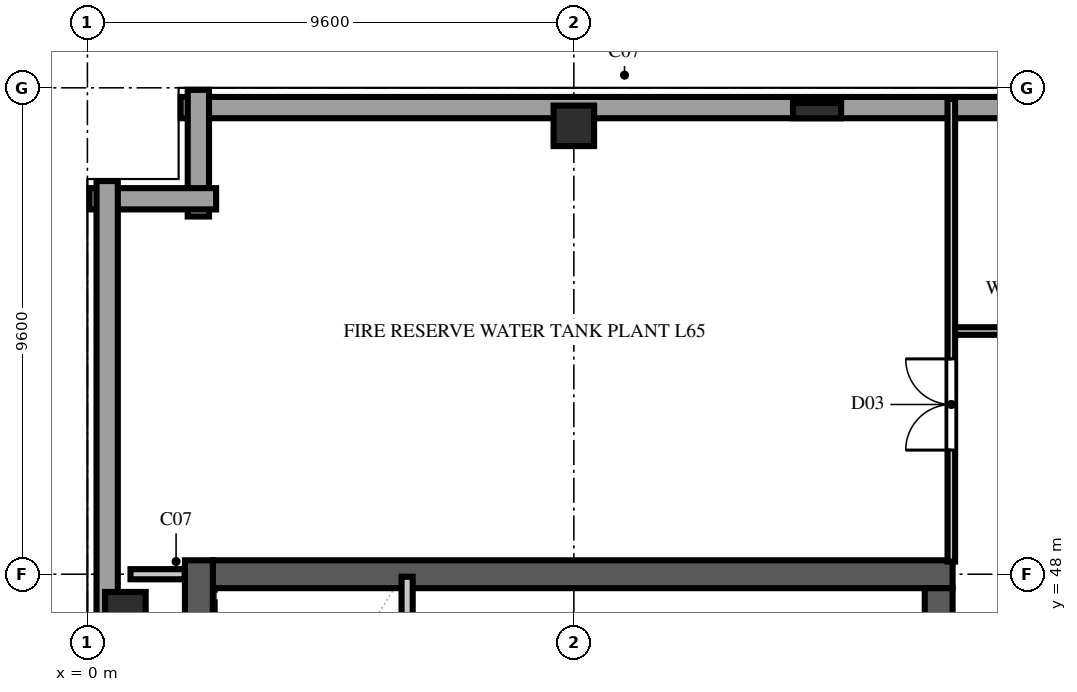
"""IFC4 building model, lengths in metres.
Left out: names, types, materials, properties, quantities, classifications, styles, units other than length and angle.
Written with IfcOpenShell. Run it as: python <this file> out.ifc"""

import sys

from ifc_helpers import new_model, si_unit, direction, frame, frame_2d, origin, origin_2d, place, context, subcontext, project, spatial, rectangle, extrude, element, fill, save


model = new_model("IFC4")
c1 = context("Model", 3, precision=1e-05, world=origin(), true_north=direction((0.0, 1.0)))
c2 = subcontext(c1, "Body", "Model", "MODEL_VIEW")
j1 = project(units=[si_unit("LENGTHUNIT", "METRE"), si_unit("PLANEANGLEUNIT", "RADIAN")], contexts=[c1])
p1 = place(None, origin())
s1 = spatial("IfcSite", under=j1, at=p1, CompositionType="ELEMENT")
p2 = place(p1, origin())
s2 = spatial("IfcBuilding", under=s1, at=p2, CompositionType="ELEMENT")
p3 = place(p2, frame((0.0, 0.0, 256.0)))
s3 = spatial("IfcBuildingStorey", under=s2, at=p3, CompositionType="ELEMENT", Elevation=256.0)
p4 = place(p3, frame((2.475, 48.0, 0.0), z_axis=(0.0, 0.0, 1.0), x_axis=(1.0, 0.0, 0.0)))
e1 = element("IfcWall", 1, at=p4, inside=s3, PredefinedType="SHEAR", context=c2, shape_type="SweptSolid", body=[
    extrude(rectangle(XDim=14.6, YDim=0.55, at=frame_2d((7.3, 0.0))), origin(), (0.0, 0.0, 1.0), 4.74),
])
p5 = place(p3, frame((2.2, 9.325, 0.0), z_axis=(0.0, 0.0, 1.0), x_axis=(0.0, 1.0, 0.0)))
e2 = element("IfcWall", 2, at=p5, inside=s3, PredefinedType="SHEAR", context=c2, shape_type="SweptSolid", body=[
    extrude(rectangle(XDim=38.95, YDim=0.55, at=frame_2d((19.475, 0.0))), origin(), (0.0, 0.0, 1.0), 4.74),
])
p6 = place(p3, frame((16.8, 36.4, 0.0), z_axis=(0.0, 0.0, 1.0), x_axis=(0.0, 1.0, 0.0)))
e3 = element("IfcWall", 3, at=p6, inside=s3, PredefinedType="SHEAR", context=c2, shape_type="SweptSolid", body=[
    extrude(rectangle(XDim=11.325, YDim=0.55, at=frame_2d((5.663, 0.0))), origin(), (0.0, 0.0, 1.0), 4.74),
])
p7 = place(p6, frame((9.2, 0.0, 0.0)))
e4 = element("IfcOpeningElement", 4, at=p7, cuts=e3, PredefinedType="OPENING", context=c2, shape_type="SweptSolid", body=[
    extrude(rectangle(XDim=0.95, YDim=2.15, at=frame_2d((0.475, 1.075))), frame((0.0, 0.287, 0.0), z_axis=(0.0, -1.0, 0.0), x_axis=(1.0, 0.0, 0.0)), (0.0, 0.0, 1.0), 0.574),
])
p8 = place(p3, frame((0.75, 47.25, 0.0), z_axis=(0.0, 0.0, 1.0), x_axis=(1.0, 0.0, 0.0)))
e5 = element("IfcColumn", 5, at=p8, inside=s3, PredefinedType="COLUMN", context=c2, shape_type="SweptSolid", body=[
    extrude(rectangle(XDim=0.8, YDim=0.8, at=origin_2d()), origin(), (0.0, 0.0, 1.0), 5.0),
])
p9 = place(p3, frame((9.6, 56.85, 0.0), z_axis=(0.0, 0.0, 1.0), x_axis=(1.0, 0.0, 0.0)))
e6 = element("IfcColumn", 6, at=p9, inside=s3, PredefinedType="COLUMN", context=c2, shape_type="SweptSolid", body=[
    extrude(rectangle(XDim=0.8, YDim=0.8, at=origin_2d()), origin(), (0.0, 0.0, 1.0), 4.7),
])
p10 = place(p3, frame((14.4, 57.15, 0.0), z_axis=(0.0, 0.0, 1.0), x_axis=(1.0, 0.0, 0.0)))
e7 = element("IfcColumn", 7, at=p10, inside=s3, PredefinedType="PILASTER", context=c2, shape_type="SweptSolid", body=[
    extrude(rectangle(XDim=0.95, YDim=0.3, at=origin_2d()), origin(), (0.0, 0.0, 1.0), 4.7),
])
p11 = place(p3, frame((36.56, 57.21, 0.0), z_axis=(0.0, 0.0, 1.0), x_axis=(-1.0, 0.0, 0.0)))
e8 = element("IfcWall", 8, at=p11, inside=s3, PredefinedType="SOLIDWALL", context=c2, shape_type="SweptSolid", body=[
    extrude(rectangle(XDim=34.72, YDim=0.42, at=frame_2d((17.36, 0.0))), origin(), (0.0, 0.0, 1.0), 4.7),
])
for number, where, z_axis, x_axis in (
    (9, (2.19, 57.56, 0.0), (0.0, 0.0, 1.0), (0.0, -1.0, 0.0)),
    (10, (2.54, 55.41, 0.0), (0.0, 0.0, 1.0), (-1.0, 0.0, 0.0)),
):
    element("IfcWall", number, at=place(p3, frame(where, z_axis=z_axis, x_axis=x_axis)), inside=s3, PredefinedType="SOLIDWALL", context=c2, shape_type="SweptSolid", body=[
        extrude(rectangle(XDim=2.5, YDim=0.42, at=frame_2d((1.25, 0.0))), origin(), (0.0, 0.0, 1.0), 4.7),
    ])
p12 = place(p3, frame((0.39, 55.76, 0.0), z_axis=(0.0, 0.0, 1.0), x_axis=(0.0, -1.0, 0.0)))
e11 = element("IfcWall", 11, at=p12, inside=s3, PredefinedType="SOLIDWALL", context=c2, shape_type="SweptSolid", body=[
    extrude(rectangle(XDim=53.92, YDim=0.42, at=frame_2d((26.96, 0.0))), origin(), (0.0, 0.0, 1.0), 4.74),
])
p13 = place(p3, frame((6.31, 40.14, 0.0), z_axis=(0.0, 0.0, 1.0), x_axis=(0.0, 1.0, 0.0)))
e12 = element("IfcWall", 12, at=p13, inside=s3, PredefinedType="SOLIDWALL", context=c2, shape_type="SweptSolid", body=[
    extrude(rectangle(XDim=7.81, YDim=0.22, at=frame_2d((3.905, 0.0))), origin(), (0.0, 0.0, 1.0), 4.74),
])
p14 = place(p3, frame((0.85, 48.0, 0.0), z_axis=(0.0, 0.0, 1.0), x_axis=(1.0, 0.0, 0.0)))
e13 = element("IfcWall", 13, at=p14, inside=s3, PredefinedType="SOLIDWALL", context=c2, shape_type="SweptSolid", body=[
    extrude(rectangle(XDim=1.07, YDim=0.2, at=frame_2d((0.535, 0.0))), origin(), (0.0, 0.0, 1.0), 4.7),
])
p15 = place(p3, frame((17.05, 52.8, 0.0), z_axis=(0.0, 0.0, 1.0), x_axis=(1.0, 0.0, 0.0)))
e14 = element("IfcWall", 14, at=p15, inside=s3, PredefinedType="PARTITIONING", context=c2, shape_type="SweptSolid", body=[
    extrude(rectangle(XDim=2.15, YDim=0.15, at=frame_2d((1.075, 0.0))), origin(), (0.0, 0.0, 1.0), 4.7),
])
p16 = place(p3, frame((17.05, 48.25, 0.0), z_axis=(0.0, 0.0, 1.0), x_axis=(0.0, 1.0, 0.0)))
e15 = element("IfcWall", 15, at=p16, inside=s3, PredefinedType="PARTITIONING", context=c2, shape_type="SweptSolid", body=[
    extrude(rectangle(XDim=9.13, YDim=0.15, at=frame_2d((4.565, 0.0))), origin(), (0.0, 0.0, 1.0), 4.7),
])
p17 = place(p16, frame((2.2, 0.0, 0.0)))
e16 = element("IfcOpeningElement", 16, at=p17, cuts=e15, PredefinedType="OPENING", context=c2, shape_type="SweptSolid", body=[
    extrude(rectangle(XDim=1.8, YDim=2.2, at=frame_2d((0.9, 1.1))), frame((0.0, 0.087, 0.0), z_axis=(0.0, -1.0, 0.0), x_axis=(1.0, 0.0, 0.0)), (0.0, 0.0, 1.0), 0.174),
])
p18 = place(p17, origin())
e17 = element("IfcDoor", 17, at=p18, inside=s3, OperationType="DOUBLE_DOOR_SINGLE_SWING", PredefinedType="DOOR", context=c2, shape_type="SweptSolid", body=[
    extrude(rectangle(XDim=1.8, YDim=2.2, at=frame_2d((0.9, 1.1))), frame((0.0, 0.025, 0.0), z_axis=(0.0, -1.0, 0.0), x_axis=(1.0, 0.0, 0.0)), (0.0, 0.0, 1.0), 0.05),
])
fill(e16, e17)
save(model, sys.argv[1])
